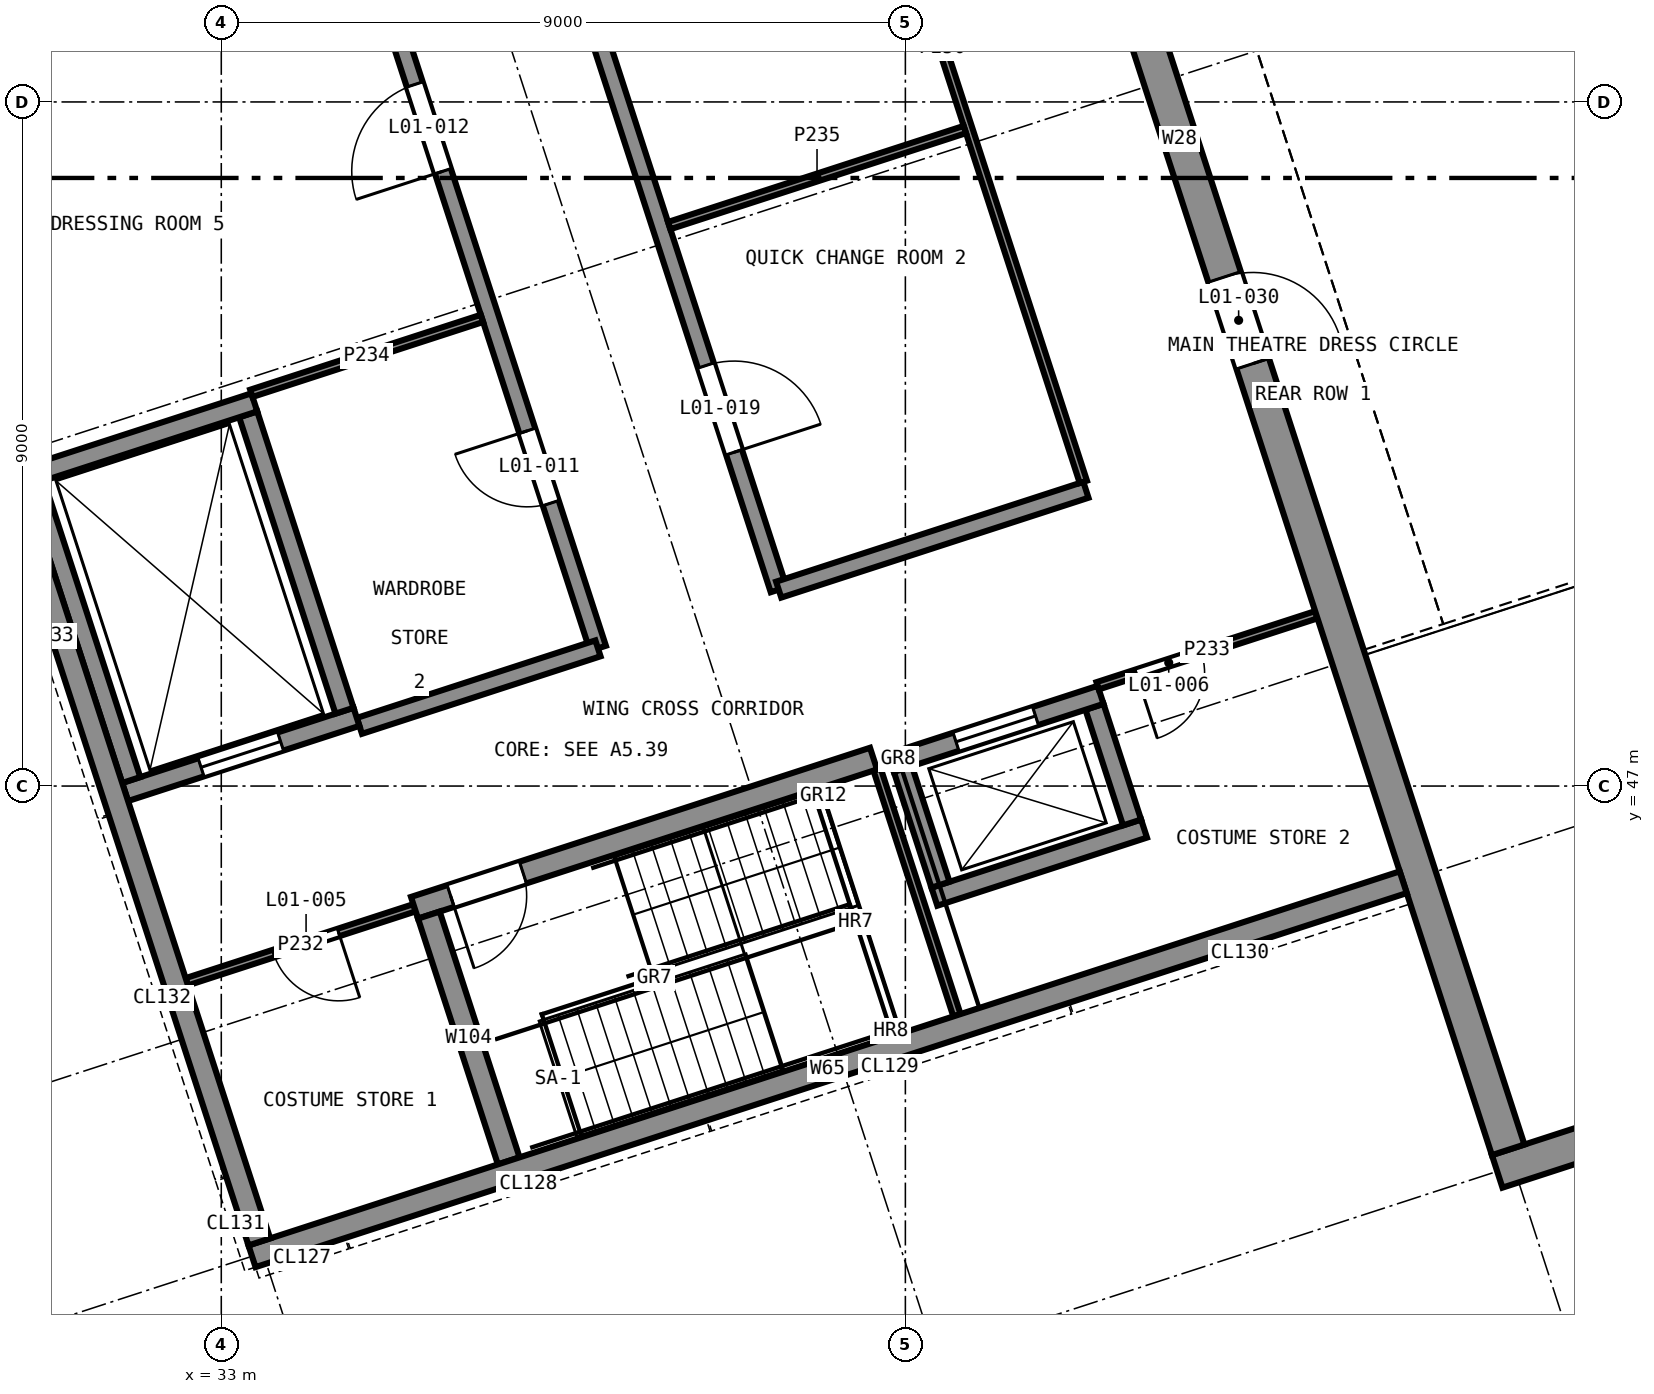
"""IFC4 building model, lengths in metres.
Left out: names, types, materials, properties, quantities, classifications, styles, units other than length and angle.
Written with IfcOpenShell. Run it as: python <this file> out.ifc"""

import sys

from ifc_helpers import new_model, si_unit, direction, frame, frame_2d, origin, place, context, subcontext, project, spatial, rectangle, extrude, element, fill, save


model = new_model("IFC4")
c1 = context("Model", 3, precision=1e-05, world=origin(), true_north=direction((0.0, 1.0)))
c2 = subcontext(c1, "Body", "Model", "MODEL_VIEW")
j1 = project(units=[si_unit("LENGTHUNIT", "METRE"), si_unit("PLANEANGLEUNIT", "RADIAN")], contexts=[c1])
p1 = place(None, origin())
s1 = spatial("IfcSite", under=j1, at=p1, CompositionType="ELEMENT")
p2 = place(p1, origin())
s2 = spatial("IfcBuilding", under=s1, at=p2, CompositionType="ELEMENT")
p3 = place(p2, frame((0.0, 0.0, 5.5)))
s3 = spatial("IfcBuildingStorey", under=s2, at=p3, CompositionType="ELEMENT", Elevation=5.5)
p4 = place(p3, frame((49.786, 41.93, 0.0), z_axis=(0.0, 0.0, 1.0), x_axis=(0.951055937194, 0.309018776661, 0.0)))
e1 = element("IfcWall", 1, at=p4, inside=s3, PredefinedType="SHEAR", context=c2, shape_type="SweptSolid", body=[
    extrude(rectangle(XDim=29.45, YDim=0.45, at=frame_2d((14.725, 0.0))), origin(), (0.0, 0.0, 1.0), 4.0),
])
p5 = place(p3, frame((49.93, 42.214, 0.0), z_axis=(0.0, 0.0, 1.0), x_axis=(-0.309016215614, 0.95105676933, 0.0)))
e2 = element("IfcWall", 2, at=p5, inside=s3, PredefinedType="SHEAR", context=c2, shape_type="SweptSolid", body=[
    extrude(rectangle(XDim=27.975, YDim=0.45, at=frame_2d((13.988, 0.0))), origin(), (0.0, 0.0, 1.0), 4.0),
])
p6 = place(p5, frame((10.875, 0.0, 0.0)))
e3 = element("IfcOpeningElement", 3, at=p6, cuts=e2, PredefinedType="OPENING", context=c2, shape_type="SweptSolid", body=[
    extrude(rectangle(XDim=1.2, YDim=2.1, at=frame_2d((0.6, 1.05))), frame((0.0, 0.235, 0.0), z_axis=(0.0, -1.0, 0.0), x_axis=(1.0, 0.0, 0.0)), (0.0, 0.0, 1.0), 0.47),
])
p7 = place(p3, frame((48.55, 45.735, 0.0), z_axis=(0.0, 0.0, 1.0), x_axis=(-0.951061216338, -0.309002528757, 0.0)))
e4 = element("IfcWall", 4, at=p7, inside=s3, PredefinedType="SOLIDWALL", context=c2, shape_type="SweptSolid", body=[
    extrude(rectangle(XDim=15.925, YDim=0.3, at=frame_2d((7.962, 0.0))), origin(), (0.0, 0.0, 1.0), 4.0),
])
p8 = place(p3, frame((33.501, 41.003, 0.0), z_axis=(0.0, 0.0, 1.0), x_axis=(-0.309017194826, 0.951056451165, 0.0)))
e5 = element("IfcWall", 5, at=p8, inside=s3, PredefinedType="SOLIDWALL", context=c2, shape_type="SweptSolid", body=[
    extrude(rectangle(XDim=53.7, YDim=0.3, at=frame_2d((26.85, 0.0))), origin(), (0.0, 0.0, 1.0), 4.0),
])
p9 = place(p8, frame((26.55, 0.0, 0.9)))
e6 = element("IfcOpeningElement", 6, at=p9, cuts=e5, PredefinedType="OPENING", context=c2, shape_type="SweptSolid", body=[
    extrude(rectangle(XDim=3.6, YDim=2.1, at=frame_2d((1.8, 1.05))), frame((0.0, 0.16, 0.0), z_axis=(0.0, -1.0, 0.0), x_axis=(1.0, 0.0, 0.0)), (0.0, 0.0, 1.0), 0.32),
])
p10 = place(p3, frame((41.581, 47.361, 0.0), z_axis=(0.0, 0.0, 1.0), x_axis=(-0.951058929949, -0.309009565815, 0.0)))
e7 = element("IfcWall", 7, at=p10, inside=s3, PredefinedType="SOLIDWALL", context=c2, shape_type="SweptSolid", body=[
    extrude(rectangle(XDim=6.35, YDim=0.3, at=frame_2d((3.175, 0.0))), origin(), (0.0, 0.0, 1.0), 3.7),
])
p11 = place(p10, frame((4.85, 0.0, 0.0)))
e8 = element("IfcOpeningElement", 8, at=p11, cuts=e7, PredefinedType="OPENING", context=c2, shape_type="SweptSolid", body=[
    extrude(rectangle(XDim=1.0, YDim=2.1, at=frame_2d((0.5, 1.05))), frame((0.0, 0.16, 0.0), z_axis=(0.0, -1.0, 0.0), x_axis=(1.0, 0.0, 0.0)), (0.0, 0.0, 1.0), 0.32),
])
p12 = place(p3, frame((35.731, 45.302, 0.0), z_axis=(0.0, 0.0, 1.0), x_axis=(0.308980533303, -0.951068362443, 0.0)))
e9 = element("IfcWall", 9, at=p12, inside=s3, PredefinedType="SOLIDWALL", context=c2, shape_type="SweptSolid", body=[
    extrude(rectangle(XDim=3.4, YDim=0.3, at=frame_2d((1.7, 0.0))), origin(), (0.0, 0.0, 1.0), 3.7),
])
p13 = place(p3, frame((42.382, 45.544, 0.0), z_axis=(0.0, 0.0, 1.0), x_axis=(0.951071801089, 0.308969948659, 0.0)))
e10 = element("IfcWall", 10, at=p13, inside=s3, PredefinedType="SHEAR", context=c2, shape_type="SweptSolid", body=[
    extrude(rectangle(XDim=2.9, YDim=0.25, at=frame_2d((1.45, 0.0))), origin(), (0.0, 0.0, 1.0), 4.0),
])
p14 = place(p3, frame((44.982, 46.521, 0.0), z_axis=(0.0, 0.0, 1.0), x_axis=(-0.308986014439, 0.951066581729, 0.0)))
e11 = element("IfcWall", 11, at=p14, inside=s3, PredefinedType="SHEAR", context=c2, shape_type="SweptSolid", body=[
    extrude(rectangle(XDim=1.6, YDim=0.25, at=frame_2d((0.8, 0.0))), origin(), (0.0, 0.0, 1.0), 4.0),
])
p15 = place(p3, frame((44.568, 48.2, 0.0), z_axis=(0.0, 0.0, 1.0), x_axis=(-0.951047059821, -0.309046096893, 0.0)))
e12 = element("IfcWall", 12, at=p15, inside=s3, PredefinedType="SHEAR", context=c2, shape_type="SweptSolid", body=[
    extrude(rectangle(XDim=2.9, YDim=0.25, at=frame_2d((1.45, 0.0))), origin(), (0.0, 0.0, 1.0), 4.0),
])
p16 = place(p15, frame((0.9, 0.0, 0.0)))
e13 = element("IfcOpeningElement", 13, at=p16, cuts=e12, PredefinedType="OPENING", context=c2, shape_type="SweptSolid", body=[
    extrude(rectangle(XDim=1.1, YDim=2.1, at=frame_2d((0.55, 1.05))), frame((0.0, 0.135, 0.0), z_axis=(0.0, -1.0, 0.0), x_axis=(1.0, 0.0, 0.0)), (0.0, 0.0, 1.0), 0.27),
])
p17 = place(p3, frame((41.968, 47.224, 0.0), z_axis=(0.0, 0.0, 1.0), x_axis=(0.308986014439, -0.951066581729, 0.0)))
e14 = element("IfcWall", 14, at=p17, inside=s3, PredefinedType="SHEAR", context=c2, shape_type="SweptSolid", body=[
    extrude(rectangle(XDim=1.6, YDim=0.25, at=frame_2d((0.8, 0.0))), origin(), (0.0, 0.0, 1.0), 4.0),
])
p18 = place(p3, frame((31.735, 46.922, 0.0), z_axis=(0.0, 0.0, 1.0), x_axis=(0.95104415986, 0.309055020985, 0.0)))
e15 = element("IfcWall", 15, at=p18, inside=s3, PredefinedType="SHEAR", context=c2, shape_type="SweptSolid", body=[
    extrude(rectangle(XDim=3.2, YDim=0.25, at=frame_2d((1.6, 0.0))), origin(), (0.0, 0.0, 1.0), 4.0),
])
p19 = place(p18, frame((1.05, 0.0, 0.0)))
e16 = element("IfcOpeningElement", 16, at=p19, cuts=e15, PredefinedType="OPENING", context=c2, shape_type="SweptSolid", body=[
    extrude(rectangle(XDim=1.1, YDim=2.1, at=frame_2d((0.55, 1.05))), frame((0.0, 0.135, 0.0), z_axis=(0.0, -1.0, 0.0), x_axis=(1.0, 0.0, 0.0)), (0.0, 0.0, 1.0), 0.27),
])
p20 = place(p3, frame((34.621, 47.991, 0.0), z_axis=(0.0, 0.0, 1.0), x_axis=(-0.309055103076, 0.951044133184, 0.0)))
e17 = element("IfcWall", 17, at=p20, inside=s3, PredefinedType="SHEAR", context=c2, shape_type="SweptSolid", body=[
    extrude(rectangle(XDim=4.1, YDim=0.25, at=frame_2d((2.05, 0.0))), origin(), (0.0, 0.0, 1.0), 4.0),
])
p21 = place(p3, frame((33.434, 52.048, 0.0), z_axis=(0.0, 0.0, 1.0), x_axis=(-0.951066581729, -0.308986014439, 0.0)))
e18 = element("IfcWall", 18, at=p21, inside=s3, PredefinedType="SHEAR", context=c2, shape_type="SweptSolid", body=[
    extrude(rectangle(XDim=3.2, YDim=0.25, at=frame_2d((1.6, 0.0))), origin(), (0.0, 0.0, 1.0), 4.0),
])
p22 = place(p3, frame((30.548, 50.979, 0.0), z_axis=(0.0, 0.0, 1.0), x_axis=(0.309055103076, -0.951044133184, 0.0)))
e19 = element("IfcWall", 19, at=p22, inside=s3, PredefinedType="SHEAR", context=c2, shape_type="SweptSolid", body=[
    extrude(rectangle(XDim=4.1, YDim=0.25, at=frame_2d((2.05, 0.0))), origin(), (0.0, 0.0, 1.0), 4.0),
])
p23 = place(p3, frame((37.956, 48.812, 0.0), z_axis=(0.0, 0.0, 1.0), x_axis=(-0.30901736393, 0.951056396219, 0.0)))
e20 = element("IfcWall", 20, at=p23, inside=s3, PredefinedType="SOLIDWALL", context=c2, shape_type="SweptSolid", body=[
    extrude(rectangle(XDim=41.7, YDim=0.22, at=frame_2d((20.85, 0.0))), origin(), (0.0, 0.0, 1.0), 3.7),
])
p24 = place(p23, frame((2.009, 0.0, 0.0)))
e21 = element("IfcOpeningElement", 21, at=p24, cuts=e20, PredefinedType="OPENING", context=c2, shape_type="SweptSolid", body=[
    extrude(rectangle(XDim=1.0, YDim=2.1, at=frame_2d((0.5, 1.05))), frame((0.0, 0.12, 0.0), z_axis=(0.0, -1.0, 0.0), x_axis=(1.0, 0.0, 0.0)), (0.0, 0.0, 1.0), 0.24),
])
p25 = place(p23, frame((6.6, 0.0, 0.0)))
e22 = element("IfcOpeningElement", 22, at=p25, cuts=e20, PredefinedType="OPENING", context=c2, shape_type="SweptSolid", body=[
    extrude(rectangle(XDim=1.2, YDim=2.1, at=frame_2d((0.6, 1.05))), frame((0.0, 0.12, 0.0), z_axis=(0.0, -1.0, 0.0), x_axis=(1.0, 0.0, 0.0)), (0.0, 0.0, 1.0), 0.24),
])
p26 = place(p23, frame((11.7, 0.0, 0.0)))
e23 = element("IfcOpeningElement", 23, at=p26, cuts=e20, PredefinedType="OPENING", context=c2, shape_type="SweptSolid", body=[
    extrude(rectangle(XDim=1.2, YDim=2.1, at=frame_2d((0.6, 1.05))), frame((0.0, 0.12, 0.0), z_axis=(0.0, -1.0, 0.0), x_axis=(1.0, 0.0, 0.0)), (0.0, 0.0, 1.0), 0.24),
])
p27 = place(p23, frame((16.7, 0.0, 0.0)))
e24 = element("IfcOpeningElement", 24, at=p27, cuts=e20, PredefinedType="OPENING", context=c2, shape_type="SweptSolid", body=[
    extrude(rectangle(XDim=1.2, YDim=2.1, at=frame_2d((0.6, 1.05))), frame((0.0, 0.12, 0.0), z_axis=(0.0, -1.0, 0.0), x_axis=(1.0, 0.0, 0.0)), (0.0, 0.0, 1.0), 0.24),
])
p28 = place(p23, frame((21.7, 0.0, 0.0)))
e25 = element("IfcOpeningElement", 25, at=p28, cuts=e20, PredefinedType="OPENING", context=c2, shape_type="SweptSolid", body=[
    extrude(rectangle(XDim=1.2, YDim=2.1, at=frame_2d((0.6, 1.05))), frame((0.0, 0.12, 0.0), z_axis=(0.0, -1.0, 0.0), x_axis=(1.0, 0.0, 0.0)), (0.0, 0.0, 1.0), 0.24),
])
p29 = place(p23, frame((26.7, 0.0, 0.0)))
e26 = element("IfcOpeningElement", 26, at=p29, cuts=e20, PredefinedType="OPENING", context=c2, shape_type="SweptSolid", body=[
    extrude(rectangle(XDim=1.2, YDim=2.1, at=frame_2d((0.6, 1.05))), frame((0.0, 0.12, 0.0), z_axis=(0.0, -1.0, 0.0), x_axis=(1.0, 0.0, 0.0)), (0.0, 0.0, 1.0), 0.24),
])
p30 = place(p23, frame((31.739, 0.0, 0.0)))
e27 = element("IfcOpeningElement", 27, at=p30, cuts=e20, PredefinedType="OPENING", context=c2, shape_type="SweptSolid", body=[
    extrude(rectangle(XDim=1.2, YDim=2.1, at=frame_2d((0.6, 1.05))), frame((0.0, 0.12, 0.0), z_axis=(0.0, -1.0, 0.0), x_axis=(1.0, 0.0, 0.0)), (0.0, 0.0, 1.0), 0.24),
])
p31 = place(p3, frame((40.333, 49.584, 0.0), z_axis=(0.0, 0.0, 1.0), x_axis=(-0.309015643281, 0.951056955291, 0.0)))
e28 = element("IfcWall", 28, at=p31, inside=s3, PredefinedType="SOLIDWALL", context=c2, shape_type="SweptSolid", body=[
    extrude(rectangle(XDim=41.7, YDim=0.22, at=frame_2d((20.85, 0.0))), origin(), (0.0, 0.0, 1.0), 3.7),
])
p32 = place(p31, frame((1.9, 0.0, 0.0)))
e29 = element("IfcOpeningElement", 29, at=p32, cuts=e28, PredefinedType="OPENING", context=c2, shape_type="SweptSolid", body=[
    extrude(rectangle(XDim=1.2, YDim=2.1, at=frame_2d((0.6, 1.05))), frame((0.0, 0.12, 0.0), z_axis=(0.0, -1.0, 0.0), x_axis=(1.0, 0.0, 0.0)), (0.0, 0.0, 1.0), 0.24),
])
p33 = place(p31, frame((8.285, 0.0, 0.0)))
e30 = element("IfcOpeningElement", 30, at=p33, cuts=e28, PredefinedType="OPENING", context=c2, shape_type="SweptSolid", body=[
    extrude(rectangle(XDim=1.0, YDim=2.1, at=frame_2d((0.5, 1.05))), frame((0.0, 0.12, 0.0), z_axis=(0.0, -1.0, 0.0), x_axis=(1.0, 0.0, 0.0)), (0.0, 0.0, 1.0), 0.24),
])
p34 = place(p31, frame((16.375, 0.0, 0.0)))
e31 = element("IfcOpeningElement", 31, at=p34, cuts=e28, PredefinedType="OPENING", context=c2, shape_type="SweptSolid", body=[
    extrude(rectangle(XDim=1.2, YDim=2.1, at=frame_2d((0.6, 1.05))), frame((0.0, 0.12, 0.0), z_axis=(0.0, -1.0, 0.0), x_axis=(1.0, 0.0, 0.0)), (0.0, 0.0, 1.0), 0.24),
])
p35 = place(p31, frame((25.752, 0.0, 0.0)))
e32 = element("IfcOpeningElement", 32, at=p35, cuts=e28, PredefinedType="OPENING", context=c2, shape_type="SweptSolid", body=[
    extrude(rectangle(XDim=1.0, YDim=2.1, at=frame_2d((0.5, 1.05))), frame((0.0, 0.12, 0.0), z_axis=(0.0, -1.0, 0.0), x_axis=(1.0, 0.0, 0.0)), (0.0, 0.0, 1.0), 0.24),
])
p36 = place(p31, frame((32.761, 0.0, 0.0)))
e33 = element("IfcOpeningElement", 33, at=p36, cuts=e28, PredefinedType="OPENING", context=c2, shape_type="SweptSolid", body=[
    extrude(rectangle(XDim=1.0, YDim=2.1, at=frame_2d((0.5, 1.05))), frame((0.0, 0.12, 0.0), z_axis=(0.0, -1.0, 0.0), x_axis=(1.0, 0.0, 0.0)), (0.0, 0.0, 1.0), 0.24),
])
p37 = place(p3, frame((34.817, 47.792, 0.0), z_axis=(0.0, 0.0, 1.0), x_axis=(0.951053095941, 0.309027520945, 0.0)))
e34 = element("IfcWall", 34, at=p37, inside=s3, PredefinedType="SOLIDWALL", context=c2, shape_type="SweptSolid", body=[
    extrude(rectangle(XDim=3.3, YDim=0.22, at=frame_2d((1.65, 0.0))), origin(), (0.0, 0.0, 1.0), 3.7),
])
p38 = place(p3, frame((40.333, 49.584, 0.0), z_axis=(0.0, 0.0, 1.0), x_axis=(0.951062770994, 0.308997743729, 0.0)))
e35 = element("IfcWall", 35, at=p38, inside=s3, PredefinedType="SOLIDWALL", context=c2, shape_type="SweptSolid", body=[
    extrude(rectangle(XDim=4.25, YDim=0.22, at=frame_2d((2.125, 0.0))), origin(), (0.0, 0.0, 1.0), 3.7),
])
p39 = place(p3, frame((32.546, 44.425, 0.0), z_axis=(0.0, 0.0, 1.0), x_axis=(0.951058557014, 0.309010713619, 0.0)))
e36 = element("IfcWall", 36, at=p39, inside=s3, PredefinedType="PARTITIONING", context=c2, shape_type="SweptSolid", body=[
    extrude(rectangle(XDim=3.15, YDim=0.1, at=frame_2d((1.575, 0.0))), origin(), (0.0, 0.0, 1.0), 3.7),
])
p40 = place(p39, frame((1.2, 0.0, 0.0)))
e37 = element("IfcOpeningElement", 37, at=p40, cuts=e36, PredefinedType="OPENING", context=c2, shape_type="SweptSolid", body=[
    extrude(rectangle(XDim=0.9, YDim=2.1, at=frame_2d((0.45, 1.05))), frame((0.0, 0.06, 0.0), z_axis=(0.0, -1.0, 0.0), x_axis=(1.0, 0.0, 0.0)), (0.0, 0.0, 1.0), 0.12),
])
p41 = place(p3, frame((44.53, 48.319, 0.0), z_axis=(0.0, 0.0, 1.0), x_axis=(0.951053046121, 0.30902767427, 0.0)))
e38 = element("IfcWall", 38, at=p41, inside=s3, PredefinedType="PARTITIONING", context=c2, shape_type="SweptSolid", body=[
    extrude(rectangle(XDim=3.025, YDim=0.1, at=frame_2d((1.512, 0.0))), origin(), (0.0, 0.0, 1.0), 3.7),
])
p42 = place(p41, frame((0.533, 0.0, 0.0)))
e39 = element("IfcOpeningElement", 39, at=p42, cuts=e38, PredefinedType="OPENING", context=c2, shape_type="SweptSolid", body=[
    extrude(rectangle(XDim=0.9, YDim=2.1, at=frame_2d((0.45, 1.05))), frame((0.0, 0.06, 0.0), z_axis=(0.0, -1.0, 0.0), x_axis=(1.0, 0.0, 0.0)), (0.0, 0.0, 1.0), 0.12),
])
p43 = place(p3, frame((33.396, 52.167, 0.0), z_axis=(0.0, 0.0, 1.0), x_axis=(0.951044192343, 0.309054921027, 0.0)))
e40 = element("IfcWall", 40, at=p43, inside=s3, PredefinedType="PARTITIONING", context=c2, shape_type="SweptSolid", body=[
    extrude(rectangle(XDim=3.19, YDim=0.1, at=frame_2d((1.595, 0.0))), origin(), (0.0, 0.0, 1.0), 3.7),
])
p44 = place(p3, frame((38.893, 54.373, 0.0), z_axis=(0.0, 0.0, 1.0), x_axis=(0.951055560564, 0.309019935796, 0.0)))
e41 = element("IfcWall", 41, at=p44, inside=s3, PredefinedType="PARTITIONING", context=c2, shape_type="SweptSolid", body=[
    extrude(rectangle(XDim=4.09, YDim=0.1, at=frame_2d((2.045, 0.0))), origin(), (0.0, 0.0, 1.0), 3.7),
])
p45 = place(p3, frame((28.745, 56.123, 0.0), z_axis=(0.0, 0.0, 1.0), x_axis=(0.951059053869, 0.309009184417, 0.0)))
e42 = element("IfcWall", 42, at=p45, inside=s3, PredefinedType="PARTITIONING", context=c2, shape_type="SweptSolid", body=[
    extrude(rectangle(XDim=6.39, YDim=0.1, at=frame_2d((3.195, 0.0))), origin(), (0.0, 0.0, 1.0), 3.7),
])
p46 = place(p3, frame((42.678, 43.985, 0.0), z_axis=(0.0, 0.0, 1.0), x_axis=(-0.309045481752, 0.951047259714, 0.0)))
e43 = element("IfcWall", 43, at=p46, inside=s3, PredefinedType="PARTITIONING", context=c2, shape_type="SweptSolid", body=[
    extrude(rectangle(XDim=3.4, YDim=0.1, at=frame_2d((1.7, 0.0))), origin(), (0.0, 0.0, 1.0), 3.7),
])
p47 = place(p3, frame((44.341, 51.002, 0.0), z_axis=(0.0, 0.0, 1.0), x_axis=(-0.309016547708, 0.951056661426, 0.0)))
e44 = element("IfcWall", 44, at=p47, inside=s3, PredefinedType="PARTITIONING", context=c2, shape_type="SweptSolid", body=[
    extrude(rectangle(XDim=11.99, YDim=0.1, at=frame_2d((5.995, 0.0))), origin(), (0.0, 0.0, 1.0), 3.7),
])
p48 = place(p16, origin())
e45 = element("IfcDoor", 45, at=p48, inside=s3, OperationType="SLIDING_TO_LEFT", PredefinedType="DOOR", context=c2, shape_type="SweptSolid", body=[
    extrude(rectangle(XDim=1.1, YDim=2.1, at=frame_2d((0.55, 1.05))), frame((0.0, 0.025, 0.0), z_axis=(0.0, -1.0, 0.0), x_axis=(1.0, 0.0, 0.0)), (0.0, 0.0, 1.0), 0.05),
])
fill(e13, e45)
p49 = place(p19, origin())
e46 = element("IfcDoor", 46, at=p49, inside=s3, OperationType="SLIDING_TO_LEFT", PredefinedType="DOOR", context=c2, shape_type="SweptSolid", body=[
    extrude(rectangle(XDim=1.1, YDim=2.1, at=frame_2d((0.55, 1.05))), frame((0.0, 0.025, 0.0), z_axis=(0.0, -1.0, 0.0), x_axis=(1.0, 0.0, 0.0)), (0.0, 0.0, 1.0), 0.05),
])
fill(e16, e46)
p50 = place(p40, frame((0.9, 0.0, 0.0), z_axis=(0.0, 0.0, 1.0), x_axis=(-1.0, 0.0, 0.0)))
e47 = element("IfcDoor", 47, at=p50, inside=s3, OperationType="SINGLE_SWING_RIGHT", PredefinedType="DOOR", context=c2, shape_type="SweptSolid", body=[
    extrude(rectangle(XDim=0.9, YDim=2.1, at=frame_2d((0.45, 1.05))), frame((0.0, 0.025, 0.0), z_axis=(0.0, -1.0, 0.0), x_axis=(1.0, 0.0, 0.0)), (0.0, 0.0, 1.0), 0.05),
])
fill(e37, e47)
p51 = place(p42, frame((0.9, 0.0, 0.0), z_axis=(0.0, 0.0, 1.0), x_axis=(-1.0, 0.0, 0.0)))
e48 = element("IfcDoor", 48, at=p51, inside=s3, OperationType="SINGLE_SWING_LEFT", PredefinedType="DOOR", context=c2, shape_type="SweptSolid", body=[
    extrude(rectangle(XDim=0.9, YDim=2.1, at=frame_2d((0.45, 1.05))), frame((0.0, 0.025, 0.0), z_axis=(0.0, -1.0, 0.0), x_axis=(1.0, 0.0, 0.0)), (0.0, 0.0, 1.0), 0.05),
])
fill(e39, e48)
p52 = place(p24, origin())
e49 = element("IfcDoor", 49, at=p52, inside=s3, OperationType="SINGLE_SWING_LEFT", PredefinedType="DOOR", context=c2, shape_type="SweptSolid", body=[
    extrude(rectangle(XDim=1.0, YDim=2.1, at=frame_2d((0.5, 1.05))), frame((0.0, 0.025, 0.0), z_axis=(0.0, -1.0, 0.0), x_axis=(1.0, 0.0, 0.0)), (0.0, 0.0, 1.0), 0.05),
])
fill(e21, e49)
p53 = place(p25, origin())
e50 = element("IfcDoor", 50, at=p53, inside=s3, OperationType="SINGLE_SWING_RIGHT", PredefinedType="DOOR", context=c2, shape_type="SweptSolid", body=[
    extrude(rectangle(XDim=1.2, YDim=2.1, at=frame_2d((0.6, 1.05))), frame((0.0, 0.025, 0.0), z_axis=(0.0, -1.0, 0.0), x_axis=(1.0, 0.0, 0.0)), (0.0, 0.0, 1.0), 0.05),
])
fill(e22, e50)
p54 = place(p32, frame((1.2, 0.0, 0.0), z_axis=(0.0, 0.0, 1.0), x_axis=(-1.0, 0.0, 0.0)))
e51 = element("IfcDoor", 51, at=p54, inside=s3, OperationType="SINGLE_SWING_LEFT", PredefinedType="DOOR", context=c2, shape_type="SweptSolid", body=[
    extrude(rectangle(XDim=1.2, YDim=2.1, at=frame_2d((0.6, 1.05))), frame((0.0, 0.025, 0.0), z_axis=(0.0, -1.0, 0.0), x_axis=(1.0, 0.0, 0.0)), (0.0, 0.0, 1.0), 0.05),
])
fill(e29, e51)
p55 = place(p11, origin())
e52 = element("IfcDoor", 52, at=p55, inside=s3, OperationType="SINGLE_SWING_LEFT", PredefinedType="DOOR", context=c2, shape_type="SweptSolid", body=[
    extrude(rectangle(XDim=1.0, YDim=2.1, at=frame_2d((0.5, 1.05))), frame((0.0, 0.025, 0.0), z_axis=(0.0, -1.0, 0.0), x_axis=(1.0, 0.0, 0.0)), (0.0, 0.0, 1.0), 0.05),
])
fill(e8, e52)
p56 = place(p6, frame((1.2, 0.0, 0.0), z_axis=(0.0, 0.0, 1.0), x_axis=(-1.0, 0.0, 0.0)))
e53 = element("IfcDoor", 53, at=p56, inside=s3, OperationType="SINGLE_SWING_LEFT", PredefinedType="DOOR", context=c2, shape_type="SweptSolid", body=[
    extrude(rectangle(XDim=1.2, YDim=2.1, at=frame_2d((0.6, 1.05))), frame((0.0, 0.025, 0.0), z_axis=(0.0, -1.0, 0.0), x_axis=(1.0, 0.0, 0.0)), (0.0, 0.0, 1.0), 0.05),
])
fill(e3, e53)
save(model, sys.argv[1])
